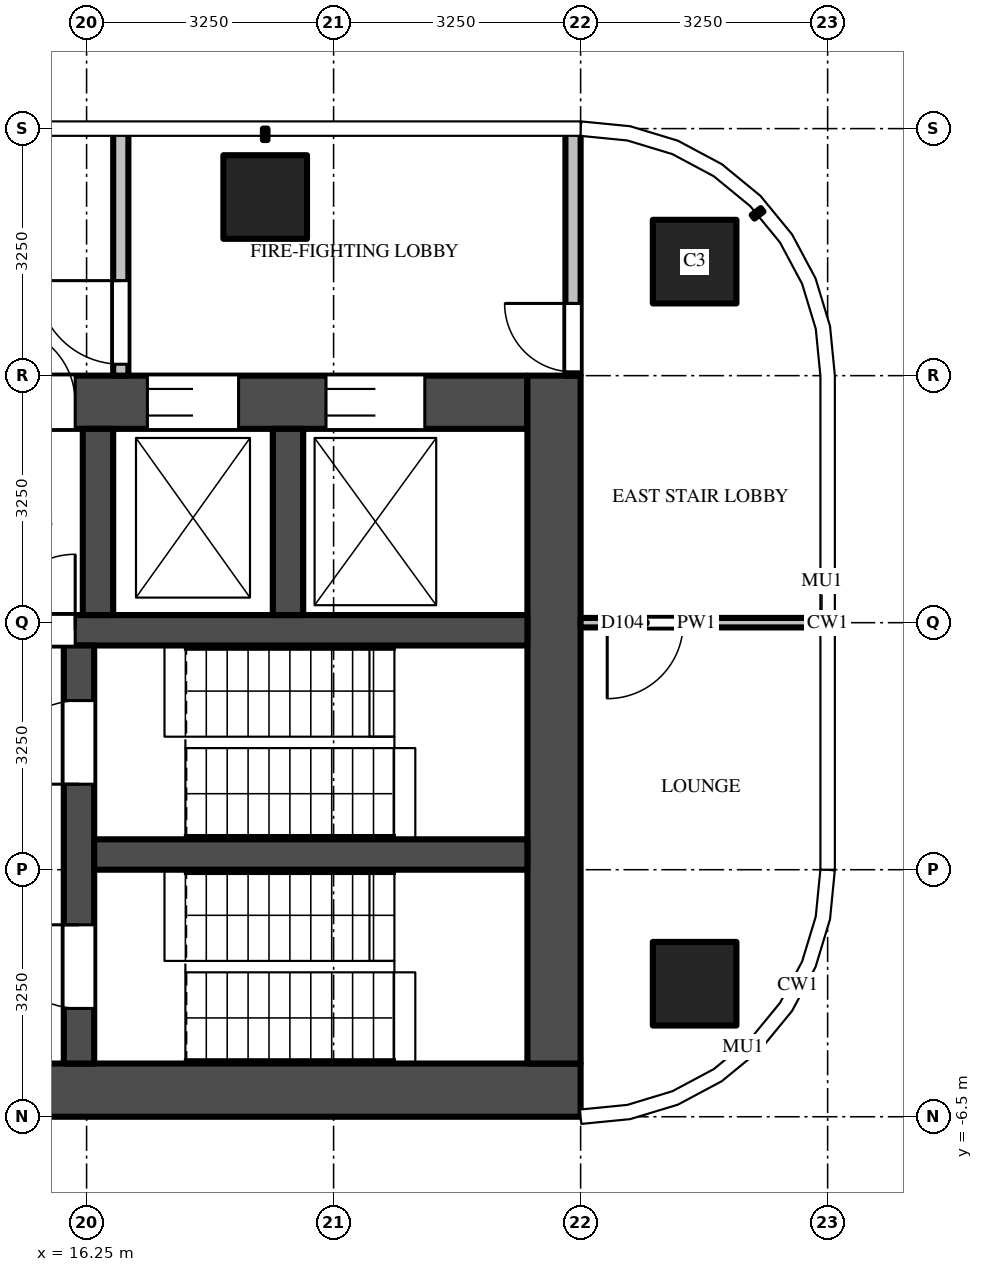
"""IFC4 building model, lengths in metres.
Left out: names, types, materials, properties, quantities, classifications, styles, units other than length and angle.
Written with IfcOpenShell. Run it as: python <this file> out.ifc"""

import sys

from ifc_helpers import new_model, si_unit, direction, frame, frame_2d, origin, origin_2d, place, context, subcontext, project, spatial, rectangle, extrude, source, transform, mapped, element, fill, save


model = new_model("IFC4")
c1 = context("Model", 3, precision=1e-05, world=origin(), true_north=direction((0.0, 1.0)))
c2 = subcontext(c1, "Body", "Model", "MODEL_VIEW")
j1 = project(units=[si_unit("LENGTHUNIT", "METRE"), si_unit("PLANEANGLEUNIT", "RADIAN")], contexts=[c1])
p1 = place(None, origin())
s1 = spatial("IfcSite", under=j1, at=p1, CompositionType="ELEMENT")
p2 = place(p1, origin())
s2 = spatial("IfcBuilding", under=s1, at=p2, CompositionType="ELEMENT")
p3 = place(p2, frame((0.0, 0.0, 248.0)))
s3 = spatial("IfcBuildingStorey", under=s2, at=p3, CompositionType="ELEMENT", Elevation=248.0)
m1 = source(origin(), c2, "Body", "SweptSolid", [
    extrude(rectangle(XDim=1.1, YDim=1.1, at=origin_2d()), origin(), (0.0, 0.0, 1.0), 3.9),
])
for number, where, z_axis, x_axis in (
    (1, (18.6, 5.6, 0.0), (0.0, 0.0, 1.0), (1.0, 0.0, 0.0)),
    (2, (24.25, 4.75, 0.0), (0.0, 0.0, 1.0), (1.0, 0.0, 0.0)),
    (3, (24.25, -4.75, 0.0), (0.0, 0.0, 1.0), (1.0, 0.0, 0.0)),
):
    element("IfcColumn", number, at=place(p3, frame(where, z_axis=z_axis, x_axis=x_axis)), inside=s3, PredefinedType="COLUMN", context=c2, shape_type="MappedRepresentation", body=[
        mapped(m1, transform((0.0, 0.0, 0.0))),
    ])
m2 = source(origin(), c2, "Body", "SweptSolid", [
    extrude(rectangle(XDim=16.6, YDim=0.7, at=frame_2d((8.3, 0.0))), origin(), (0.0, 0.0, 1.0), 3.7),
])
p4 = place(p3, frame((6.15, -6.15, 0.0), z_axis=(0.0, 0.0, 1.0), x_axis=(1.0, 0.0, 0.0)))
e4 = element("IfcWall", 4, at=p4, inside=s3, PredefinedType="SHEAR", context=c2, shape_type="MappedRepresentation", body=[
    mapped(m2, transform((0.0, 0.0, 0.0))),
])
m3 = source(origin(), c2, "Body", "SweptSolid", [
    extrude(rectangle(XDim=14.85, YDim=0.7, at=frame_2d((7.425, 0.0))), origin(), (0.0, 0.0, 1.0), 3.7),
])
p5 = place(p3, frame((7.2, 2.9, 0.0), z_axis=(0.0, 0.0, 1.0), x_axis=(1.0, 0.0, 0.0)))
e5 = element("IfcWall", 5, at=p5, inside=s3, PredefinedType="SHEAR", context=c2, shape_type="MappedRepresentation", body=[
    mapped(m3, transform((0.0, 0.0, 0.0))),
])
m4 = source(origin(), c2, "Body", "SweptSolid", [
    extrude(rectangle(XDim=1.1, YDim=2.1, at=frame_2d((0.55, 1.05))), frame((0.0, 0.36, 0.0), z_axis=(0.0, -1.0, 0.0), x_axis=(1.0, 0.0, 0.0)), (0.0, 0.0, 1.0), 0.72),
])
p6 = place(p5, frame((0.55, 0.0, 0.0)))
e6 = element("IfcOpeningElement", 6, at=p6, cuts=e5, PredefinedType="OPENING", context=c2, shape_type="MappedRepresentation", body=[
    mapped(m4, transform((0.0, 0.0, 0.0))),
])
p7 = place(p5, frame((3.15, 0.0, 0.0)))
e7 = element("IfcOpeningElement", 7, at=p7, cuts=e5, PredefinedType="OPENING", context=c2, shape_type="MappedRepresentation", body=[
    mapped(m4, transform((0.0, 0.0, 0.0))),
])
m5 = source(origin(), c2, "Body", "SweptSolid", [
    extrude(rectangle(XDim=1.2, YDim=2.1, at=frame_2d((0.6, 1.05))), frame((0.0, 0.36, 0.0), z_axis=(0.0, -1.0, 0.0), x_axis=(1.0, 0.0, 0.0)), (0.0, 0.0, 1.0), 0.72),
])
p8 = place(p5, frame((5.7, 0.0, 0.0)))
e8 = element("IfcOpeningElement", 8, at=p8, cuts=e5, PredefinedType="OPENING", context=c2, shape_type="MappedRepresentation", body=[
    mapped(m5, transform((0.0, 0.0, 0.0))),
])
m6 = source(origin(), c2, "Body", "SweptSolid", [
    extrude(rectangle(XDim=1.3, YDim=2.1, at=frame_2d((0.65, 1.05))), frame((0.0, 0.36, 0.0), z_axis=(0.0, -1.0, 0.0), x_axis=(1.0, 0.0, 0.0)), (0.0, 0.0, 1.0), 0.72),
])
p9 = place(p5, frame((12.2, 0.0, 0.0)))
e9 = element("IfcOpeningElement", 9, at=p9, cuts=e5, PredefinedType="OPENING", context=c2, shape_type="MappedRepresentation", body=[
    mapped(m6, transform((0.0, 0.0, 0.0))),
])
p10 = place(p5, frame((9.85, 0.0, 0.0)))
e10 = element("IfcOpeningElement", 10, at=p10, cuts=e5, PredefinedType="OPENING", context=c2, shape_type="MappedRepresentation", body=[
    mapped(m5, transform((0.0, 0.0, 0.0))),
])
m7 = source(origin(), c2, "Body", "SweptSolid", [
    extrude(rectangle(XDim=1.0, YDim=2.1, at=frame_2d((0.5, 1.05))), frame((0.0, 0.36, 0.0), z_axis=(0.0, -1.0, 0.0), x_axis=(1.0, 0.0, 0.0)), (0.0, 0.0, 1.0), 0.72),
])
p11 = place(p5, frame((7.9, 0.0, 0.0)))
e11 = element("IfcOpeningElement", 11, at=p11, cuts=e5, PredefinedType="OPENING", context=c2, shape_type="MappedRepresentation", body=[
    mapped(m7, transform((0.0, 0.0, 0.0))),
])
m8 = source(origin(), c2, "Body", "SweptSolid", [
    extrude(rectangle(XDim=9.05, YDim=0.7, at=frame_2d((4.525, 0.0))), origin(), (0.0, 0.0, 1.0), 3.7),
])
p12 = place(p3, frame((22.4, -5.8, 0.0), z_axis=(0.0, 0.0, 1.0), x_axis=(0.0, 1.0, 0.0)))
e12 = element("IfcWall", 12, at=p12, inside=s3, PredefinedType="SHEAR", context=c2, shape_type="MappedRepresentation", body=[
    mapped(m8, transform((0.0, 0.0, 0.0))),
])
m9 = source(origin(), c2, "Body", "SweptSolid", [
    extrude(rectangle(XDim=14.85, YDim=0.4, at=frame_2d((7.425, 0.0))), origin(), (0.0, 0.0, 1.0), 3.7),
])
p13 = place(p3, frame((7.2, -0.1, 0.0), z_axis=(0.0, 0.0, 1.0), x_axis=(1.0, 0.0, 0.0)))
e13 = element("IfcWall", 13, at=p13, inside=s3, PredefinedType="SHEAR", context=c2, shape_type="MappedRepresentation", body=[
    mapped(m9, transform((0.0, 0.0, 0.0))),
])
m10 = source(origin(), c2, "Body", "SweptSolid", [
    extrude(rectangle(XDim=1.0, YDim=2.1, at=frame_2d((0.5, 1.05))), frame((0.0, 0.21, 0.0), z_axis=(0.0, -1.0, 0.0), x_axis=(1.0, 0.0, 0.0)), (0.0, 0.0, 1.0), 0.42),
])
p14 = place(p13, frame((7.9, 0.0, 0.0)))
e14 = element("IfcOpeningElement", 14, at=p14, cuts=e13, PredefinedType="OPENING", context=c2, shape_type="MappedRepresentation", body=[
    mapped(m10, transform((0.0, 0.0, 0.0))),
])
m11 = source(origin(), c2, "Body", "SweptSolid", [
    extrude(rectangle(XDim=5.5, YDim=0.4, at=frame_2d((2.75, 0.0))), origin(), (0.0, 0.0, 1.0), 3.7),
])
p15 = place(p3, frame((16.15, -5.8, 0.0), z_axis=(0.0, 0.0, 1.0), x_axis=(0.0, 1.0, 0.0)))
e15 = element("IfcWall", 15, at=p15, inside=s3, PredefinedType="SHEAR", context=c2, shape_type="MappedRepresentation", body=[
    mapped(m11, transform((0.0, 0.0, 0.0))),
])
m12 = source(origin(), c2, "Body", "SweptSolid", [
    extrude(rectangle(XDim=1.1, YDim=2.1, at=frame_2d((0.55, 1.05))), frame((0.0, 0.21, 0.0), z_axis=(0.0, -1.0, 0.0), x_axis=(1.0, 0.0, 0.0)), (0.0, 0.0, 1.0), 0.42),
])
p16 = place(p15, frame((0.725, 0.0, 0.0)))
e16 = element("IfcOpeningElement", 16, at=p16, cuts=e15, PredefinedType="OPENING", context=c2, shape_type="MappedRepresentation", body=[
    mapped(m12, transform((0.0, 0.0, 0.0))),
])
p17 = place(p15, frame((3.675, 0.0, 0.0)))
e17 = element("IfcOpeningElement", 17, at=p17, cuts=e15, PredefinedType="OPENING", context=c2, shape_type="MappedRepresentation", body=[
    mapped(m12, transform((0.0, 0.0, 0.0))),
])
m13 = source(origin(), c2, "Body", "SweptSolid", [
    extrude(rectangle(XDim=5.7, YDim=0.4, at=frame_2d((2.85, 0.0))), origin(), (0.0, 0.0, 1.0), 3.7),
])
p18 = place(p3, frame((16.35, -3.05, 0.0), z_axis=(0.0, 0.0, 1.0), x_axis=(1.0, 0.0, 0.0)))
e18 = element("IfcWall", 18, at=p18, inside=s3, PredefinedType="SHEAR", context=c2, shape_type="MappedRepresentation", body=[
    mapped(m13, transform((0.0, 0.0, 0.0))),
])
m14 = source(origin(), c2, "Body", "SweptSolid", [
    extrude(rectangle(XDim=2.45, YDim=0.4, at=frame_2d((1.225, 0.0))), origin(), (0.0, 0.0, 1.0), 3.7),
])
for number, where, z_axis, x_axis in (
    (19, (16.4, 0.1, 0.0), (0.0, 0.0, 1.0), (0.0, 1.0, 0.0)),
    (20, (18.9, 0.1, 0.0), (0.0, 0.0, 1.0), (0.0, 1.0, 0.0)),
):
    element("IfcWall", number, at=place(p3, frame(where, z_axis=z_axis, x_axis=x_axis)), inside=s3, PredefinedType="SHEAR", context=c2, shape_type="MappedRepresentation", body=[
        mapped(m14, transform((0.0, 0.0, 0.0))),
    ])
m15 = source(origin(), c2, "Body", "SweptSolid", [
    extrude(rectangle(XDim=3.25, YDim=0.2, at=frame_2d((1.625, 0.0))), origin(), (0.0, 0.0, 1.0), 3.7),
])
p19 = place(p3, frame((16.7, 3.25, 0.0), z_axis=(0.0, 0.0, 1.0), x_axis=(0.0, 1.0, 0.0)))
e21 = element("IfcWall", 21, at=p19, inside=s3, PredefinedType="PARTITIONING", context=c2, shape_type="MappedRepresentation", body=[
    mapped(m15, transform((0.0, 0.0, 0.0))),
])
m16 = source(origin(), c2, "Body", "SweptSolid", [
    extrude(rectangle(XDim=1.1, YDim=2.1, at=frame_2d((0.55, 1.05))), frame((0.0, 0.11, 0.0), z_axis=(0.0, -1.0, 0.0), x_axis=(1.0, 0.0, 0.0)), (0.0, 0.0, 1.0), 0.22),
])
p20 = place(p19, frame((0.15, 0.0, 0.0)))
e22 = element("IfcOpeningElement", 22, at=p20, cuts=e21, PredefinedType="OPENING", context=c2, shape_type="MappedRepresentation", body=[
    mapped(m16, transform((0.0, 0.0, 0.0))),
])
p21 = place(p3, frame((22.65, 3.25, 0.0), z_axis=(0.0, 0.0, 1.0), x_axis=(0.0, 1.0, 0.0)))
e23 = element("IfcWall", 23, at=p21, inside=s3, PredefinedType="PARTITIONING", context=c2, shape_type="MappedRepresentation", body=[
    mapped(m15, transform((0.0, 0.0, 0.0))),
])
m17 = source(origin(), c2, "Body", "SweptSolid", [
    extrude(rectangle(XDim=0.9, YDim=2.1, at=frame_2d((0.45, 1.05))), frame((0.0, 0.11, 0.0), z_axis=(0.0, -1.0, 0.0), x_axis=(1.0, 0.0, 0.0)), (0.0, 0.0, 1.0), 0.22),
])
p22 = place(p21, frame((0.05, 0.0, 0.0)))
e24 = element("IfcOpeningElement", 24, at=p22, cuts=e23, PredefinedType="OPENING", context=c2, shape_type="MappedRepresentation", body=[
    mapped(m17, transform((0.0, 0.0, 0.0))),
])
m18 = source(origin(), c2, "Body", "SweptSolid", [
    extrude(rectangle(XDim=3.05, YDim=0.125, at=frame_2d((1.525, 0.0))), origin(), (0.0, 0.0, 1.0), 2.78),
])
p23 = place(p3, frame((25.8, 0.0, 0.0), z_axis=(0.0, 0.0, 1.0), x_axis=(-1.0, 0.0, 0.0)))
e25 = element("IfcWall", 25, at=p23, inside=s3, PredefinedType="PARTITIONING", context=c2, shape_type="MappedRepresentation", body=[
    mapped(m18, transform((0.0, 0.0, 0.0))),
])
m19 = source(origin(), c2, "Body", "SweptSolid", [
    extrude(rectangle(XDim=1.0, YDim=2.1, at=frame_2d((0.5, 1.05))), frame((0.0, 0.073, 0.0), z_axis=(0.0, -1.0, 0.0), x_axis=(1.0, 0.0, 0.0)), (0.0, 0.0, 1.0), 0.145),
])
p24 = place(p23, frame((1.7, 0.0, 0.0)))
e26 = element("IfcOpeningElement", 26, at=p24, cuts=e25, PredefinedType="OPENING", context=c2, shape_type="MappedRepresentation", body=[
    mapped(m19, transform((0.0, 0.0, 0.0))),
])
m20 = source(origin(), c2, "Body", "SweptSolid", [
    extrude(rectangle(XDim=1.3, YDim=2.1, at=frame_2d((0.65, 1.05))), frame((0.0, -0.275, 0.0), z_axis=(0.0, -1.0, 0.0), x_axis=(1.0, 0.0, 0.0)), (0.0, 0.0, 1.0), 0.05),
])
p25 = place(p9, origin())
e27 = element("IfcDoor", 27, at=p25, inside=s3, OperationType="DOUBLE_DOOR_SLIDING", PredefinedType="DOOR", context=c2, shape_type="MappedRepresentation", body=[
    mapped(m20, transform((0.0, 0.0, 0.0))),
])
fill(e9, e27)
m21 = source(origin(), c2, "Body", "SweptSolid", [
    extrude(rectangle(XDim=1.2, YDim=2.1, at=frame_2d((0.6, 1.05))), frame((0.0, -0.275, 0.0), z_axis=(0.0, -1.0, 0.0), x_axis=(1.0, 0.0, 0.0)), (0.0, 0.0, 1.0), 0.05),
])
p26 = place(p10, origin())
e28 = element("IfcDoor", 28, at=p26, inside=s3, OperationType="DOUBLE_DOOR_SLIDING", PredefinedType="DOOR", context=c2, shape_type="MappedRepresentation", body=[
    mapped(m21, transform((0.0, 0.0, 0.0))),
])
fill(e10, e28)
m22 = source(origin(), c2, "Body", "SweptSolid", [
    extrude(rectangle(XDim=1.1, YDim=2.1, at=frame_2d((0.55, 1.05))), frame((0.0, 0.025, 0.0), z_axis=(0.0, -1.0, 0.0), x_axis=(1.0, 0.0, 0.0)), (0.0, 0.0, 1.0), 0.05),
])
p27 = place(p16, origin())
e29 = element("IfcDoor", 29, at=p27, inside=s3, OperationType="SINGLE_SWING_RIGHT", PredefinedType="DOOR", context=c2, shape_type="MappedRepresentation", body=[
    mapped(m22, transform((0.0, 0.0, 0.0))),
])
fill(e16, e29)
p28 = place(p17, origin())
e30 = element("IfcDoor", 30, at=p28, inside=s3, OperationType="SINGLE_SWING_LEFT", PredefinedType="DOOR", context=c2, shape_type="MappedRepresentation", body=[
    mapped(m22, transform((0.0, 0.0, 0.0))),
])
fill(e17, e30)
m23 = source(origin(), c2, "Body", "SweptSolid", [
    extrude(rectangle(XDim=1.0, YDim=2.1, at=frame_2d((0.5, 1.05))), frame((0.0, 0.025, 0.0), z_axis=(0.0, -1.0, 0.0), x_axis=(1.0, 0.0, 0.0)), (0.0, 0.0, 1.0), 0.05),
])
p29 = place(p14, origin())
e31 = element("IfcDoor", 31, at=p29, inside=s3, OperationType="SINGLE_SWING_RIGHT", PredefinedType="DOOR", context=c2, shape_type="MappedRepresentation", body=[
    mapped(m23, transform((0.0, 0.0, 0.0))),
])
fill(e14, e31)
m24 = source(origin(), c2, "Body", "SweptSolid", [
    extrude(rectangle(XDim=1.0, YDim=2.1, at=frame_2d((0.5, 1.05))), frame((0.0, -0.275, 0.0), z_axis=(0.0, -1.0, 0.0), x_axis=(1.0, 0.0, 0.0)), (0.0, 0.0, 1.0), 0.05),
])
p30 = place(p11, origin())
e32 = element("IfcDoor", 32, at=p30, inside=s3, OperationType="SINGLE_SWING_LEFT", PredefinedType="DOOR", context=c2, shape_type="MappedRepresentation", body=[
    mapped(m24, transform((0.0, 0.0, 0.0))),
])
fill(e11, e32)
p31 = place(p20, origin())
e33 = element("IfcDoor", 33, at=p31, inside=s3, OperationType="SINGLE_SWING_RIGHT", PredefinedType="DOOR", context=c2, shape_type="MappedRepresentation", body=[
    mapped(m22, transform((0.0, 0.0, 0.0))),
])
fill(e22, e33)
m25 = source(origin(), c2, "Body", "SweptSolid", [
    extrude(rectangle(XDim=0.9, YDim=2.1, at=frame_2d((0.45, 1.05))), frame((0.0, 0.025, 0.0), z_axis=(0.0, -1.0, 0.0), x_axis=(1.0, 0.0, 0.0)), (0.0, 0.0, 1.0), 0.05),
])
p32 = place(p22, origin())
e34 = element("IfcDoor", 34, at=p32, inside=s3, OperationType="SINGLE_SWING_RIGHT", PredefinedType="DOOR", context=c2, shape_type="MappedRepresentation", body=[
    mapped(m25, transform((0.0, 0.0, 0.0))),
])
fill(e24, e34)
p33 = place(p24, origin())
e35 = element("IfcDoor", 35, at=p33, inside=s3, OperationType="SINGLE_SWING_RIGHT", PredefinedType="DOOR", context=c2, shape_type="MappedRepresentation", body=[
    mapped(m23, transform((0.0, 0.0, 0.0))),
])
fill(e26, e35)
save(model, sys.argv[1])
